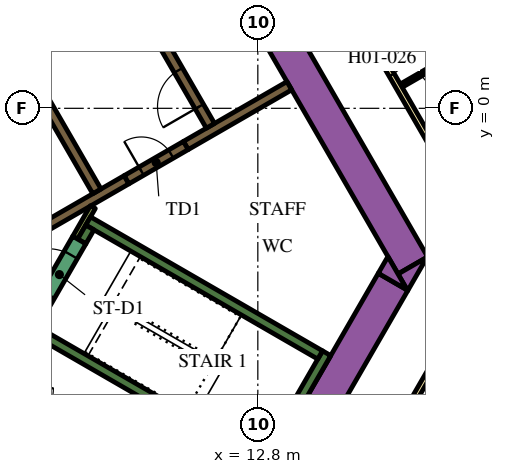
"""IFC4 building model, lengths in metres.
Left out: names, types, materials, properties, quantities, classifications, styles, units other than length and angle.
Written with IfcOpenShell. Run it as: python <this file> out.ifc"""

import sys

from ifc_helpers import new_model, si_unit, direction, frame, frame_2d, origin, place, context, subcontext, project, spatial, polyline, rectangle, outline, extrude, element, fill, save


model = new_model("IFC4")
c1 = context("Model", 3, precision=1e-05, world=origin(), true_north=direction((0.0, 1.0)))
c2 = subcontext(c1, "Body", "Model", "MODEL_VIEW")
j1 = project(units=[si_unit("LENGTHUNIT", "METRE"), si_unit("PLANEANGLEUNIT", "RADIAN")], contexts=[c1])
p1 = place(None, origin())
s1 = spatial("IfcSite", under=j1, at=p1, CompositionType="ELEMENT")
p2 = place(p1, origin())
s2 = spatial("IfcBuilding", under=s1, at=p2, CompositionType="ELEMENT")
p3 = place(p2, frame((0.0, 0.0, 31.5)))
s3 = spatial("IfcBuildingStorey", under=s2, at=p3, CompositionType="ELEMENT", Elevation=31.5)
p4 = place(p3, frame((6.711, 13.476, 0.0), z_axis=(0.0, 0.0, 1.0), x_axis=(0.500002723396, -0.866023831425, 0.0)))
e1 = element("IfcWall", 1, at=p4, inside=s3, PredefinedType="SOLIDWALL", context=c2, shape_type="SweptSolid", body=[
    extrude(rectangle(XDim=20.334, YDim=0.9, at=frame_2d((10.167, 0.0))), origin(), (0.0, 0.0, 1.0), 3.9),
])
p5 = place(p3, origin())
e2 = element("IfcWall", 2, at=p5, inside=s3, PredefinedType="SOLIDWALL", context=c2, shape_type="SweptSolid", body=[
    extrude(outline(polyline([(16.743, -4.8), (16.489, -4.36), (17.251, -3.92), (16.743, -4.8)])), origin(), (0.0, 0.0, 1.0), 3.9),
])
p6 = place(p3, frame((11.695, -12.644, 0.0), z_axis=(0.0, 0.0, 1.0), x_axis=(0.500010229568, 0.86601949766, 0.0)))
e3 = element("IfcWall", 3, at=p6, inside=s3, PredefinedType="SOLIDWALL", context=c2, shape_type="SweptSolid", body=[
    extrude(rectangle(XDim=9.326, YDim=0.9, at=frame_2d((4.663, 0.0))), origin(), (0.0, 0.0, 1.0), 3.9),
])
e4 = element("IfcWall", 4, at=p5, inside=s3, PredefinedType="SOLIDWALL", context=c2, shape_type="SweptSolid", body=[
    extrude(outline(polyline([(16.223, -3.9), (16.732, -4.78), (15.969, -4.34), (16.223, -3.9)])), origin(), (0.0, 0.0, 1.0), 3.9),
])
p7 = place(p3, frame((12.885, -9.431, 0.0), z_axis=(0.0, 0.0, 1.0), x_axis=(0.500020560727, 0.866013532718, 0.0)))
e5 = element("IfcWall", 5, at=p7, inside=s3, PredefinedType="SOLIDWALL", context=c2, shape_type="SweptSolid", body=[
    extrude(rectangle(XDim=3.45, YDim=0.25, at=frame_2d((1.725, 0.0))), origin(), (0.0, 0.0, 1.0), 3.9),
])
p8 = place(p3, frame((12.84, -9.261, 0.0), z_axis=(0.0, 0.0, 1.0), x_axis=(-0.866013990052, 0.500019768644, 0.0)))
e6 = element("IfcWall", 6, at=p8, inside=s3, PredefinedType="SOLIDWALL", context=c2, shape_type="SweptSolid", body=[
    extrude(rectangle(XDim=6.8, YDim=0.25, at=frame_2d((3.4, 0.0))), origin(), (0.0, 0.0, 1.0), 3.9),
])
p9 = place(p3, frame((8.334, -2.964, 0.0), z_axis=(0.0, 0.0, 1.0), x_axis=(0.866016039709, -0.500016218704, 0.0)))
e7 = element("IfcWall", 7, at=p9, inside=s3, PredefinedType="SOLIDWALL", context=c2, shape_type="SweptSolid", body=[
    extrude(rectangle(XDim=7.05, YDim=0.25, at=frame_2d((3.525, 0.0))), origin(), (0.0, 0.0, 1.0), 3.9),
])
p10 = place(p3, frame((8.168, -3.503, 0.0), z_axis=(0.0, 0.0, 1.0), x_axis=(0.49972245349, 0.866185586049, 0.0)))
e8 = element("IfcWall", 8, at=p10, inside=s3, PredefinedType="SOLIDWALL", context=c2, shape_type="SweptSolid", body=[
    extrude(rectangle(XDim=0.425, YDim=0.25, at=frame_2d((0.212, 0.0))), origin(), (0.0, 0.0, 1.0), 3.9),
])
p11 = place(p3, frame((13.629, 0.594, 0.0), z_axis=(0.0, 0.0, 1.0), x_axis=(-0.86602790099, -0.499995674689, 0.0)))
e9 = element("IfcWall", 9, at=p11, inside=s3, PredefinedType="SOLIDWALL", context=c2, shape_type="SweptSolid", body=[
    extrude(rectangle(XDim=3.146, YDim=0.25, at=frame_2d((1.573, 0.0))), origin(), (0.0, 0.0, 1.0), 3.9),
])
p12 = place(p3, frame((6.614, -3.456, 0.0), z_axis=(0.0, 0.0, 1.0), x_axis=(0.86602447079, 0.500001615989, 0.0)))
e10 = element("IfcWall", 10, at=p12, inside=s3, PredefinedType="SOLIDWALL", context=c2, shape_type="SweptSolid", body=[
    extrude(rectangle(XDim=3.154, YDim=0.25, at=frame_2d((1.577, 0.0))), origin(), (0.0, 0.0, 1.0), 3.9),
])
p13 = place(p3, frame((8.459, -2.599, 0.0), z_axis=(0.0, 0.0, 1.0), x_axis=(-0.500041054325, -0.866001699761, 0.0)))
e11 = element("IfcWall", 11, at=p13, inside=s3, PredefinedType="PARTITIONING", context=c2, shape_type="SweptSolid", body=[
    extrude(rectangle(XDim=0.929, YDim=0.15, at=frame_2d((0.464, 0.0))), origin(), (0.0, 0.0, 1.0), 3.9),
])
p14 = place(p3, frame((11.553, -0.46, 0.0), z_axis=(0.0, 0.0, 1.0), x_axis=(-0.500006514828, 0.866021642414, 0.0)))
e12 = element("IfcWall", 12, at=p14, inside=s3, PredefinedType="SOLIDWALL", context=c2, shape_type="SweptSolid", body=[
    extrude(rectangle(XDim=12.35, YDim=0.25, at=frame_2d((6.175, 0.0))), origin(), (0.0, 0.0, 1.0), 3.9),
])
p15 = place(p14, frame((0.585, 0.0, 0.0)))
e13 = element("IfcOpeningElement", 13, at=p15, cuts=e12, PredefinedType="OPENING", context=c2, shape_type="SweptSolid", body=[
    extrude(rectangle(XDim=1.1, YDim=2.1, at=frame_2d((0.55, 1.05))), frame((0.0, 0.135, 0.0), z_axis=(0.0, -1.0, 0.0), x_axis=(1.0, 0.0, 0.0)), (0.0, 0.0, 1.0), 0.27),
])
p16 = place(p14, frame((3.105, 0.0, 0.0)))
e14 = element("IfcOpeningElement", 14, at=p16, cuts=e12, PredefinedType="OPENING", context=c2, shape_type="SweptSolid", body=[
    extrude(rectangle(XDim=1.1, YDim=2.1, at=frame_2d((0.55, 1.05))), frame((0.0, 0.135, 0.0), z_axis=(0.0, -1.0, 0.0), x_axis=(1.0, 0.0, 0.0)), (0.0, 0.0, 1.0), 0.27),
])
p17 = place(p14, frame((5.625, 0.0, 0.0)))
e15 = element("IfcOpeningElement", 15, at=p17, cuts=e12, PredefinedType="OPENING", context=c2, shape_type="SweptSolid", body=[
    extrude(rectangle(XDim=1.1, YDim=2.1, at=frame_2d((0.55, 1.05))), frame((0.0, 0.135, 0.0), z_axis=(0.0, -1.0, 0.0), x_axis=(1.0, 0.0, 0.0)), (0.0, 0.0, 1.0), 0.27),
])
p18 = place(p3, frame((8.565, -2.185, 0.0), z_axis=(0.0, 0.0, 1.0), x_axis=(-0.499997954832, 0.866026584559, 0.0)))
e16 = element("IfcWall", 16, at=p18, inside=s3, PredefinedType="SOLIDWALL", context=c2, shape_type="SweptSolid", body=[
    extrude(rectangle(XDim=12.35, YDim=0.25, at=frame_2d((6.175, 0.0))), origin(), (0.0, 0.0, 1.0), 3.9),
])
p19 = place(p18, frame((5.725, 0.0, 0.0)))
e17 = element("IfcOpeningElement", 17, at=p19, cuts=e16, PredefinedType="OPENING", context=c2, shape_type="SweptSolid", body=[
    extrude(rectangle(XDim=0.9, YDim=2.1, at=frame_2d((0.45, 1.05))), frame((0.0, 0.135, 0.0), z_axis=(0.0, -1.0, 0.0), x_axis=(1.0, 0.0, 0.0)), (0.0, 0.0, 1.0), 0.27),
])
p20 = place(p3, frame((7.053, -5.284, 0.0), z_axis=(0.0, 0.0, 1.0), x_axis=(0.500078061341, 0.865980330357, 0.0)))
e18 = element("IfcWall", 18, at=p20, inside=s3, PredefinedType="SOLIDWALL", context=c2, shape_type="SweptSolid", body=[
    extrude(rectangle(XDim=2.1, YDim=0.4, at=frame_2d((1.05, 0.0))), origin(), (0.0, 0.0, 1.0), 3.9),
])
p21 = place(p20, frame((0.45, 0.0, 0.0)))
e19 = element("IfcOpeningElement", 19, at=p21, cuts=e18, PredefinedType="OPENING", context=c2, shape_type="SweptSolid", body=[
    extrude(rectangle(XDim=1.2, YDim=2.1, at=frame_2d((0.6, 1.05))), frame((0.0, 0.21, 0.0), z_axis=(0.0, -1.0, 0.0), x_axis=(1.0, 0.0, 0.0)), (0.0, 0.0, 1.0), 0.42),
])
p22 = place(p3, frame((9.346, -1.879, 0.0), z_axis=(0.0, 0.0, 1.0), x_axis=(0.866047807691, 0.499961193289, 0.0)))
e20 = element("IfcWall", 20, at=p22, inside=s3, PredefinedType="SOLIDWALL", context=c2, shape_type="SweptSolid", body=[
    extrude(rectangle(XDim=1.8, YDim=0.25, at=frame_2d((0.9, 0.0))), origin(), (0.0, 0.0, 1.0), 3.9),
])
p23 = place(p22, frame((0.45, 0.0, 0.0)))
e21 = element("IfcOpeningElement", 21, at=p23, cuts=e20, PredefinedType="OPENING", context=c2, shape_type="SweptSolid", body=[
    extrude(rectangle(XDim=0.9, YDim=2.1, at=frame_2d((0.45, 1.05))), frame((0.0, 0.135, 0.0), z_axis=(0.0, -1.0, 0.0), x_axis=(1.0, 0.0, 0.0)), (0.0, 0.0, 1.0), 0.27),
])
p24 = place(p3, frame((19.081, -3.9, 0.0), z_axis=(0.0, 0.0, 1.0), x_axis=(-0.499974327079, -0.866040225545, 0.0)))
e22 = element("IfcWall", 22, at=p24, inside=s3, PredefinedType="PARTITIONING", context=c2, shape_type="SweptSolid", body=[
    extrude(rectangle(XDim=5.258, YDim=0.15, at=frame_2d((2.629, 0.0))), origin(), (0.0, 0.0, 1.0), 2.75),
])
p25 = place(p3, frame((6.163, 18.475, 0.0), z_axis=(0.0, 0.0, 1.0), x_axis=(0.500001317485, -0.866024643133, 0.0)))
e23 = element("IfcWall", 23, at=p25, inside=s3, PredefinedType="PARTITIONING", context=c2, shape_type="SweptSolid", body=[
    extrude(rectangle(XDim=25.767, YDim=0.15, at=frame_2d((12.883, 0.0))), origin(), (0.0, 0.0, 1.0), 2.75),
])
p26 = place(p25, frame((24.586, 0.0, 0.0)))
e24 = element("IfcOpeningElement", 24, at=p26, cuts=e23, PredefinedType="OPENING", context=c2, shape_type="SweptSolid", body=[
    extrude(rectangle(XDim=1.0, YDim=2.1, at=frame_2d((0.5, 1.05))), frame((0.0, 0.085, 0.0), z_axis=(0.0, -1.0, 0.0), x_axis=(1.0, 0.0, 0.0)), (0.0, 0.0, 1.0), 0.17),
])
p27 = place(p25, frame((19.319, 0.0, 0.0)))
e25 = element("IfcOpeningElement", 25, at=p27, cuts=e23, PredefinedType="OPENING", context=c2, shape_type="SweptSolid", body=[
    extrude(rectangle(XDim=1.0, YDim=2.1, at=frame_2d((0.5, 1.05))), frame((0.0, 0.085, 0.0), z_axis=(0.0, -1.0, 0.0), x_axis=(1.0, 0.0, 0.0)), (0.0, 0.0, 1.0), 0.17),
])
p28 = place(p25, frame((18.012, 0.0, 0.0)))
e26 = element("IfcOpeningElement", 26, at=p28, cuts=e23, PredefinedType="OPENING", context=c2, shape_type="SweptSolid", body=[
    extrude(rectangle(XDim=1.0, YDim=2.1, at=frame_2d((0.5, 1.05))), frame((0.0, 0.085, 0.0), z_axis=(0.0, -1.0, 0.0), x_axis=(1.0, 0.0, 0.0)), (0.0, 0.0, 1.0), 0.17),
])
p29 = place(p25, frame((6.824, 0.0, 0.0)))
e27 = element("IfcOpeningElement", 27, at=p29, cuts=e23, PredefinedType="OPENING", context=c2, shape_type="SweptSolid", body=[
    extrude(rectangle(XDim=1.1, YDim=2.1, at=frame_2d((0.55, 1.05))), frame((0.0, 0.085, 0.0), z_axis=(0.0, -1.0, 0.0), x_axis=(1.0, 0.0, 0.0)), (0.0, 0.0, 1.0), 0.17),
])
p30 = place(p25, frame((4.658, 0.0, 0.0)))
e28 = element("IfcOpeningElement", 28, at=p30, cuts=e23, PredefinedType="OPENING", context=c2, shape_type="SweptSolid", body=[
    extrude(rectangle(XDim=0.9, YDim=2.1, at=frame_2d((0.45, 1.05))), frame((0.0, 0.085, 0.0), z_axis=(0.0, -1.0, 0.0), x_axis=(1.0, 0.0, 0.0)), (0.0, 0.0, 1.0), 0.17),
])
p31 = place(p25, frame((0.18, 0.0, 0.0)))
e29 = element("IfcOpeningElement", 29, at=p31, cuts=e23, PredefinedType="OPENING", context=c2, shape_type="SweptSolid", body=[
    extrude(rectangle(XDim=1.0, YDim=2.1, at=frame_2d((0.5, 1.05))), frame((0.0, 0.085, 0.0), z_axis=(0.0, -1.0, 0.0), x_axis=(1.0, 0.0, 0.0)), (0.0, 0.0, 1.0), 0.17),
])
p32 = place(p3, frame((27.134, -2.779, 0.0), z_axis=(0.0, 0.0, 1.0), x_axis=(-0.8882049501, -0.459447457951, 0.0)))
e30 = element("IfcWall", 30, at=p32, inside=s3, PredefinedType="PARTITIONING", context=c2, shape_type="SweptSolid", body=[
    extrude(rectangle(XDim=11.638, YDim=0.15, at=frame_2d((5.819, 0.0))), origin(), (0.0, 0.0, 1.0), 2.75),
])
p33 = place(p3, frame((19.127, 2.071, 0.0), z_axis=(0.0, 0.0, 1.0), x_axis=(-0.866003658127, -0.500037662692, 0.0)))
e31 = element("IfcWall", 31, at=p33, inside=s3, PredefinedType="PARTITIONING", context=c2, shape_type="SweptSolid", body=[
    extrude(rectangle(XDim=2.95, YDim=0.1, at=frame_2d((1.475, 0.0))), origin(), (0.0, 0.0, 1.0), 2.75),
])
p34 = place(p33, frame((1.45, 0.0, 0.0)))
e32 = element("IfcOpeningElement", 32, at=p34, cuts=e31, PredefinedType="OPENING", context=c2, shape_type="SweptSolid", body=[
    extrude(rectangle(XDim=0.9, YDim=2.1, at=frame_2d((0.45, 1.05))), frame((0.0, 0.06, 0.0), z_axis=(0.0, -1.0, 0.0), x_axis=(1.0, 0.0, 0.0)), (0.0, 0.0, 1.0), 0.12),
])
p35 = place(p15, origin())
e33 = element("IfcDoor", 33, at=p35, inside=s3, OperationType="DOUBLE_DOOR_SLIDING", PredefinedType="DOOR", context=c2, shape_type="SweptSolid", body=[
    extrude(rectangle(XDim=1.1, YDim=2.1, at=frame_2d((0.55, 1.05))), frame((0.0, 0.025, 0.0), z_axis=(0.0, -1.0, 0.0), x_axis=(1.0, 0.0, 0.0)), (0.0, 0.0, 1.0), 0.05),
])
fill(e13, e33)
p36 = place(p21, origin())
e34 = element("IfcDoor", 34, at=p36, inside=s3, OperationType="SINGLE_SWING_LEFT", PredefinedType="DOOR", context=c2, shape_type="SweptSolid", body=[
    extrude(rectangle(XDim=1.2, YDim=2.1, at=frame_2d((0.6, 1.05))), frame((0.0, 0.025, 0.0), z_axis=(0.0, -1.0, 0.0), x_axis=(1.0, 0.0, 0.0)), (0.0, 0.0, 1.0), 0.05),
])
fill(e19, e34)
p37 = place(p23, origin())
e35 = element("IfcDoor", 35, at=p37, inside=s3, OperationType="SINGLE_SWING_LEFT", PredefinedType="DOOR", context=c2, shape_type="SweptSolid", body=[
    extrude(rectangle(XDim=0.9, YDim=2.1, at=frame_2d((0.45, 1.05))), frame((0.0, 0.025, 0.0), z_axis=(0.0, -1.0, 0.0), x_axis=(1.0, 0.0, 0.0)), (0.0, 0.0, 1.0), 0.05),
])
fill(e21, e35)
p38 = place(p27, origin())
e36 = element("IfcDoor", 36, at=p38, inside=s3, OperationType="SINGLE_SWING_LEFT", PredefinedType="DOOR", context=c2, shape_type="SweptSolid", body=[
    extrude(rectangle(XDim=1.0, YDim=2.1, at=frame_2d((0.5, 1.05))), frame((0.0, 0.025, 0.0), z_axis=(0.0, -1.0, 0.0), x_axis=(1.0, 0.0, 0.0)), (0.0, 0.0, 1.0), 0.05),
])
fill(e25, e36)
p39 = place(p34, origin())
e37 = element("IfcDoor", 37, at=p39, inside=s3, OperationType="SINGLE_SWING_LEFT", PredefinedType="DOOR", context=c2, shape_type="SweptSolid", body=[
    extrude(rectangle(XDim=0.9, YDim=2.1, at=frame_2d((0.45, 1.05))), frame((0.0, 0.025, 0.0), z_axis=(0.0, -1.0, 0.0), x_axis=(1.0, 0.0, 0.0)), (0.0, 0.0, 1.0), 0.05),
])
fill(e32, e37)
save(model, sys.argv[1])
